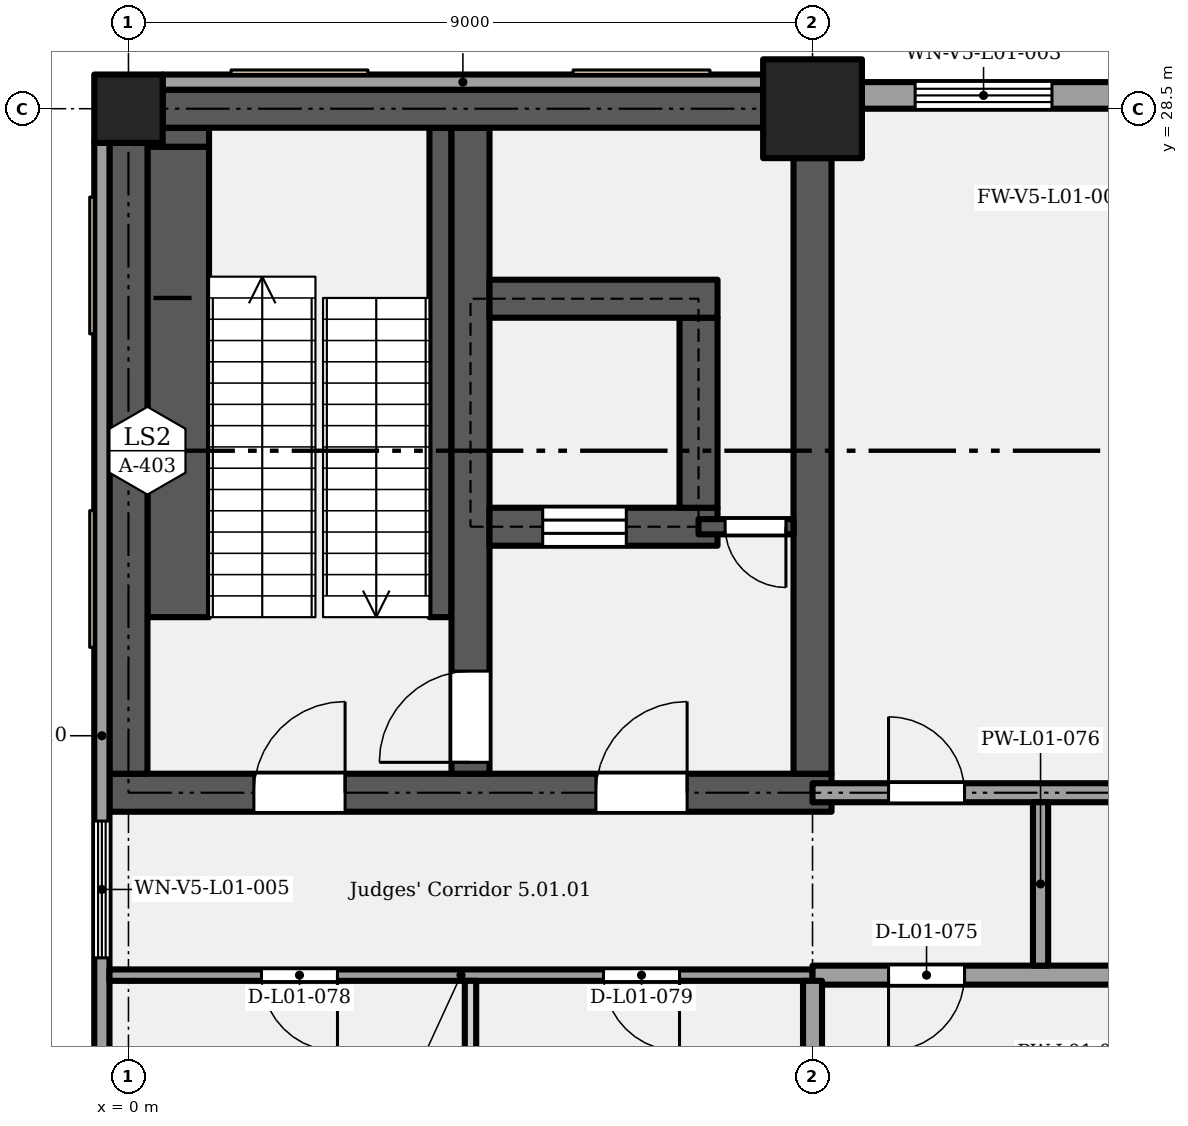
"""IFC4 building model, lengths in metres.
Left out: names, types, materials, properties, quantities, classifications, styles, units other than length and angle.
Written with IfcOpenShell. Run it as: python <this file> out.ifc"""

import sys

from ifc_helpers import new_model, si_unit, direction, frame, frame_2d, origin, origin_2d, place, context, subcontext, project, spatial, rectangle, extrude, element, fill, save


model = new_model("IFC4")
c1 = context("Model", 3, precision=1e-05, world=origin(), true_north=direction((0.0, 1.0)))
c2 = subcontext(c1, "Body", "Model", "MODEL_VIEW")
j1 = project(units=[si_unit("LENGTHUNIT", "METRE"), si_unit("PLANEANGLEUNIT", "RADIAN")], contexts=[c1])
p1 = place(None, origin())
s1 = spatial("IfcSite", under=j1, at=p1, CompositionType="ELEMENT")
p2 = place(p1, origin())
s2 = spatial("IfcBuilding", under=s1, at=p2, CompositionType="ELEMENT")
p3 = place(p2, frame((0.0, 0.0, 6.6)))
s3 = spatial("IfcBuildingStorey", under=s2, at=p3, CompositionType="ELEMENT", Elevation=6.6)
p4 = place(p3, frame((0.0, 28.5, 0.0), z_axis=(0.0, 0.0, 1.0), x_axis=(1.0, 0.0, 0.0)))
e1 = element("IfcColumn", 1, at=p4, inside=s3, PredefinedType="COLUMN", context=c2, shape_type="SweptSolid", body=[
    extrude(rectangle(XDim=0.9, YDim=0.9, at=origin_2d()), origin(), (0.0, 0.0, 1.0), 5.4),
])
p5 = place(p3, frame((9.0, 28.5, 0.0), z_axis=(0.0, 0.0, 1.0), x_axis=(1.0, 0.0, 0.0)))
e2 = element("IfcColumn", 2, at=p5, inside=s3, PredefinedType="COLUMN", context=c2, shape_type="SweptSolid", body=[
    extrude(rectangle(XDim=1.3, YDim=1.3, at=origin_2d()), origin(), (0.0, 0.0, 1.0), 5.4),
])
p6 = place(p3, frame((-0.25, 19.5, 0.0), z_axis=(0.0, 0.0, 1.0), x_axis=(1.0, 0.0, 0.0)))
e3 = element("IfcWall", 3, at=p6, inside=s3, PredefinedType="SHEAR", context=c2, shape_type="SweptSolid", body=[
    extrude(rectangle(XDim=9.5, YDim=0.5, at=frame_2d((4.75, 0.0))), origin(), (0.0, 0.0, 1.0), 5.1),
])
p7 = place(p6, frame((1.9, 0.0, 0.0)))
e4 = element("IfcOpeningElement", 4, at=p7, cuts=e3, PredefinedType="OPENING", context=c2, shape_type="SweptSolid", body=[
    extrude(rectangle(XDim=1.2, YDim=2.1, at=frame_2d((0.6, 1.05))), frame((0.0, 0.26, 0.0), z_axis=(0.0, -1.0, 0.0), x_axis=(1.0, 0.0, 0.0)), (0.0, 0.0, 1.0), 0.52),
])
p8 = place(p6, frame((6.4, 0.0, 0.0)))
e5 = element("IfcOpeningElement", 5, at=p8, cuts=e3, PredefinedType="OPENING", context=c2, shape_type="SweptSolid", body=[
    extrude(rectangle(XDim=1.2, YDim=2.1, at=frame_2d((0.6, 1.05))), frame((0.0, 0.26, 0.0), z_axis=(0.0, -1.0, 0.0), x_axis=(1.0, 0.0, 0.0)), (0.0, 0.0, 1.0), 0.52),
])
p9 = place(p3, frame((0.0, 19.75, 0.0), z_axis=(0.0, 0.0, 1.0), x_axis=(0.0, 1.0, 0.0)))
e6 = element("IfcWall", 6, at=p9, inside=s3, PredefinedType="SHEAR", context=c2, shape_type="SweptSolid", body=[
    extrude(rectangle(XDim=8.3, YDim=0.5, at=frame_2d((4.15, 0.0))), origin(), (0.0, 0.0, 1.0), 5.1),
])
p10 = place(p3, frame((4.5, 19.75, 0.0), z_axis=(0.0, 0.0, 1.0), x_axis=(0.0, 1.0, 0.0)))
e7 = element("IfcWall", 7, at=p10, inside=s3, PredefinedType="SHEAR", context=c2, shape_type="SweptSolid", body=[
    extrude(rectangle(XDim=8.5, YDim=0.5, at=frame_2d((4.25, 0.0))), origin(), (0.0, 0.0, 1.0), 5.1),
])
p11 = place(p10, frame((0.15, 0.0, 0.0)))
e8 = element("IfcOpeningElement", 8, at=p11, cuts=e7, PredefinedType="OPENING", context=c2, shape_type="SweptSolid", body=[
    extrude(rectangle(XDim=1.2, YDim=2.1, at=frame_2d((0.6, 1.05))), frame((0.0, 0.26, 0.0), z_axis=(0.0, -1.0, 0.0), x_axis=(1.0, 0.0, 0.0)), (0.0, 0.0, 1.0), 0.52),
])
p12 = place(p3, frame((9.0, 19.75, 0.0), z_axis=(0.0, 0.0, 1.0), x_axis=(0.0, 1.0, 0.0)))
e9 = element("IfcWall", 9, at=p12, inside=s3, PredefinedType="SHEAR", context=c2, shape_type="SweptSolid", body=[
    extrude(rectangle(XDim=8.1, YDim=0.5, at=frame_2d((4.05, 0.0))), origin(), (0.0, 0.0, 1.0), 5.1),
])
p13 = place(p3, frame((4.75, 23.0, 0.0), z_axis=(0.0, 0.0, 1.0), x_axis=(1.0, 0.0, 0.0)))
e10 = element("IfcWall", 10, at=p13, inside=s3, PredefinedType="SHEAR", context=c2, shape_type="SweptSolid", body=[
    extrude(rectangle(XDim=3.0, YDim=0.5, at=frame_2d((1.5, 0.0))), origin(), (0.0, 0.0, 1.0), 5.1),
])
p14 = place(p13, frame((0.7, 0.0, 0.0)))
e11 = element("IfcOpeningElement", 11, at=p14, cuts=e10, PredefinedType="OPENING", context=c2, shape_type="SweptSolid", body=[
    extrude(rectangle(XDim=1.1, YDim=2.1, at=frame_2d((0.55, 1.05))), frame((0.0, 0.26, 0.0), z_axis=(0.0, -1.0, 0.0), x_axis=(1.0, 0.0, 0.0)), (0.0, 0.0, 1.0), 0.52),
])
p15 = place(p3, frame((7.5, 23.25, 0.0), z_axis=(0.0, 0.0, 1.0), x_axis=(0.0, 1.0, 0.0)))
e12 = element("IfcWall", 12, at=p15, inside=s3, PredefinedType="SHEAR", context=c2, shape_type="SweptSolid", body=[
    extrude(rectangle(XDim=2.5, YDim=0.5, at=frame_2d((1.25, 0.0))), origin(), (0.0, 0.0, 1.0), 5.1),
])
p16 = place(p3, frame((4.75, 26.0, 0.0), z_axis=(0.0, 0.0, 1.0), x_axis=(1.0, 0.0, 0.0)))
e13 = element("IfcWall", 13, at=p16, inside=s3, PredefinedType="SHEAR", context=c2, shape_type="SweptSolid", body=[
    extrude(rectangle(XDim=3.0, YDim=0.5, at=frame_2d((1.5, 0.0))), origin(), (0.0, 0.0, 1.0), 5.1),
])
p17 = place(p3, frame((0.45, 28.5, 0.0), z_axis=(0.0, 0.0, 1.0), x_axis=(1.0, 0.0, 0.0)))
e14 = element("IfcWall", 14, at=p17, inside=s3, PredefinedType="SHEAR", context=c2, shape_type="SweptSolid", body=[
    extrude(rectangle(XDim=7.9, YDim=0.5, at=frame_2d((3.95, 0.0))), origin(), (0.0, 0.0, 1.0), 5.1),
])
p18 = place(p3, frame((0.45, 28.85, 0.0), z_axis=(0.0, 0.0, 1.0), x_axis=(1.0, 0.0, 0.0)))
e15 = element("IfcWall", 15, at=p18, inside=s3, PredefinedType="SOLIDWALL", context=c2, shape_type="SweptSolid", body=[
    extrude(rectangle(XDim=7.9, YDim=0.2, at=frame_2d((3.95, 0.0))), origin(), (0.0, 0.0, 1.0), 5.1),
])
p19 = place(p3, frame((9.65, 28.675, 0.0), z_axis=(0.0, 0.0, 1.0), x_axis=(1.0, 0.0, 0.0)))
e16 = element("IfcWall", 16, at=p19, inside=s3, PredefinedType="SOLIDWALL", context=c2, shape_type="SweptSolid", body=[
    extrude(rectangle(XDim=7.7, YDim=0.35, at=frame_2d((3.85, 0.0))), origin(), (0.0, 0.0, 1.0), 5.1),
])
p20 = place(p19, frame((0.7, 0.0, 1.2)))
e17 = element("IfcOpeningElement", 17, at=p20, cuts=e16, PredefinedType="OPENING", context=c2, shape_type="SweptSolid", body=[
    extrude(rectangle(XDim=1.8, YDim=3.3, at=frame_2d((0.9, 1.65))), frame((0.0, 0.185, 0.0), z_axis=(0.0, -1.0, 0.0), x_axis=(1.0, 0.0, 0.0)), (0.0, 0.0, 1.0), 0.37),
])
p21 = place(p19, frame((5.2, 0.0, 1.2)))
e18 = element("IfcOpeningElement", 18, at=p21, cuts=e16, PredefinedType="OPENING", context=c2, shape_type="SweptSolid", body=[
    extrude(rectangle(XDim=1.8, YDim=3.3, at=frame_2d((0.9, 1.65))), frame((0.0, 0.185, 0.0), z_axis=(0.0, -1.0, 0.0), x_axis=(1.0, 0.0, 0.0)), (0.0, 0.0, 1.0), 0.37),
])
p22 = place(p3, frame((-0.35, 12.45, 0.0), z_axis=(0.0, 0.0, 1.0), x_axis=(0.0, 1.0, 0.0)))
e19 = element("IfcWall", 19, at=p22, inside=s3, PredefinedType="SOLIDWALL", context=c2, shape_type="SweptSolid", body=[
    extrude(rectangle(XDim=15.6, YDim=0.2, at=frame_2d((7.8, 0.0))), origin(), (0.0, 0.0, 1.0), 5.1),
])
p23 = place(p22, frame((4.877, 0.0, 1.2)))
e20 = element("IfcOpeningElement", 20, at=p23, cuts=e19, PredefinedType="OPENING", context=c2, shape_type="SweptSolid", body=[
    extrude(rectangle(XDim=1.8, YDim=3.3, at=frame_2d((0.9, 1.65))), frame((0.0, 0.11, 0.0), z_axis=(0.0, -1.0, 0.0), x_axis=(1.0, 0.0, 0.0)), (0.0, 0.0, 1.0), 0.22),
])
p24 = place(p3, frame((-0.25, 17.1, 0.0), z_axis=(0.0, 0.0, 1.0), x_axis=(1.0, 0.0, 0.0)))
e21 = element("IfcWall", 21, at=p24, inside=s3, PredefinedType="PARTITIONING", context=c2, shape_type="SweptSolid", body=[
    extrude(rectangle(XDim=9.25, YDim=0.15, at=frame_2d((4.625, 0.0))), origin(), (0.0, 0.0, 1.0), 5.1),
])
p25 = place(p24, frame((3.0, 0.0, 0.0), z_axis=(0.0, 0.0, 1.0), x_axis=(-1.0, 0.0, 0.0)))
e22 = element("IfcOpeningElement", 22, at=p25, cuts=e21, PredefinedType="OPENING", context=c2, shape_type="SweptSolid", body=[
    extrude(rectangle(XDim=1.0, YDim=2.1, at=frame_2d((0.5, 1.05))), frame((0.0, 0.085, 0.0), z_axis=(0.0, -1.0, 0.0), x_axis=(1.0, 0.0, 0.0)), (0.0, 0.0, 1.0), 0.17),
])
p26 = place(p24, frame((7.5, 0.0, 0.0), z_axis=(0.0, 0.0, 1.0), x_axis=(-1.0, 0.0, 0.0)))
e23 = element("IfcOpeningElement", 23, at=p26, cuts=e21, PredefinedType="OPENING", context=c2, shape_type="SweptSolid", body=[
    extrude(rectangle(XDim=1.0, YDim=2.1, at=frame_2d((0.5, 1.05))), frame((0.0, 0.085, 0.0), z_axis=(0.0, -1.0, 0.0), x_axis=(1.0, 0.0, 0.0)), (0.0, 0.0, 1.0), 0.17),
])
p27 = place(p3, frame((9.0, 17.1, 0.0), z_axis=(0.0, 0.0, 1.0), x_axis=(1.0, 0.0, 0.0)))
e24 = element("IfcWall", 24, at=p27, inside=s3, PredefinedType="PARTITIONING", context=c2, shape_type="SweptSolid", body=[
    extrude(rectangle(XDim=9.0, YDim=0.25, at=frame_2d((4.5, 0.0))), origin(), (0.0, 0.0, 1.0), 5.1),
])
p28 = place(p27, frame((6.9, 0.0, 0.0), z_axis=(0.0, 0.0, 1.0), x_axis=(-1.0, 0.0, 0.0)))
e25 = element("IfcOpeningElement", 25, at=p28, cuts=e24, PredefinedType="OPENING", context=c2, shape_type="SweptSolid", body=[
    extrude(rectangle(XDim=1.8, YDim=2.4, at=frame_2d((0.9, 1.2))), frame((0.0, 0.135, 0.0), z_axis=(0.0, -1.0, 0.0), x_axis=(1.0, 0.0, 0.0)), (0.0, 0.0, 1.0), 0.27),
])
p29 = place(p27, frame((2.0, 0.0, 0.0), z_axis=(0.0, 0.0, 1.0), x_axis=(-1.0, 0.0, 0.0)))
e26 = element("IfcOpeningElement", 26, at=p29, cuts=e24, PredefinedType="OPENING", context=c2, shape_type="SweptSolid", body=[
    extrude(rectangle(XDim=1.0, YDim=2.1, at=frame_2d((0.5, 1.05))), frame((0.0, 0.135, 0.0), z_axis=(0.0, -1.0, 0.0), x_axis=(1.0, 0.0, 0.0)), (0.0, 0.0, 1.0), 0.27),
])
p30 = place(p3, frame((9.0, 19.5, 0.0), z_axis=(0.0, 0.0, 1.0), x_axis=(1.0, 0.0, 0.0)))
e27 = element("IfcWall", 27, at=p30, inside=s3, PredefinedType="PARTITIONING", context=c2, shape_type="SweptSolid", body=[
    extrude(rectangle(XDim=9.0, YDim=0.25, at=frame_2d((4.5, 0.0))), origin(), (0.0, 0.0, 1.0), 5.1),
])
p31 = place(p30, frame((5.1, 0.0, 0.0)))
e28 = element("IfcOpeningElement", 28, at=p31, cuts=e27, PredefinedType="OPENING", context=c2, shape_type="SweptSolid", body=[
    extrude(rectangle(XDim=1.8, YDim=2.4, at=frame_2d((0.9, 1.2))), frame((0.0, 0.135, 0.0), z_axis=(0.0, -1.0, 0.0), x_axis=(1.0, 0.0, 0.0)), (0.0, 0.0, 1.0), 0.27),
])
p32 = place(p30, frame((1.0, 0.0, 0.0)))
e29 = element("IfcOpeningElement", 29, at=p32, cuts=e27, PredefinedType="OPENING", context=c2, shape_type="SweptSolid", body=[
    extrude(rectangle(XDim=1.0, YDim=2.1, at=frame_2d((0.5, 1.05))), frame((0.0, 0.135, 0.0), z_axis=(0.0, -1.0, 0.0), x_axis=(1.0, 0.0, 0.0)), (0.0, 0.0, 1.0), 0.27),
])
p33 = place(p3, frame((7.5, 23.0, 0.0), z_axis=(0.0, 0.0, 1.0), x_axis=(1.0, 0.0, 0.0)))
e30 = element("IfcWall", 30, at=p33, inside=s3, PredefinedType="SHEAR", context=c2, shape_type="SweptSolid", body=[
    extrude(rectangle(XDim=1.25, YDim=0.2, at=frame_2d((0.625, 0.0))), origin(), (0.0, 0.0, 1.0), 5.1),
])
p34 = place(p33, frame((1.15, 0.0, 0.0), z_axis=(0.0, 0.0, 1.0), x_axis=(-1.0, 0.0, 0.0)))
e31 = element("IfcOpeningElement", 31, at=p34, cuts=e30, PredefinedType="OPENING", context=c2, shape_type="SweptSolid", body=[
    extrude(rectangle(XDim=0.8, YDim=2.0, at=frame_2d((0.4, 1.0))), frame((0.0, 0.11, 0.0), z_axis=(0.0, -1.0, 0.0), x_axis=(1.0, 0.0, 0.0)), (0.0, 0.0, 1.0), 0.22),
])
p35 = place(p3, frame((4.5, 12.0, 0.0), z_axis=(0.0, 0.0, 1.0), x_axis=(0.0, 1.0, 0.0)))
e32 = element("IfcWall", 32, at=p35, inside=s3, PredefinedType="PARTITIONING", context=c2, shape_type="SweptSolid", body=[
    extrude(rectangle(XDim=5.025, YDim=0.15, at=frame_2d((2.512, 0.0))), origin(), (0.0, 0.0, 1.0), 5.1),
])
p36 = place(p3, frame((9.0, 12.65, 0.0), z_axis=(0.0, 0.0, 1.0), x_axis=(0.0, 1.0, 0.0)))
e33 = element("IfcWall", 33, at=p36, inside=s3, PredefinedType="PARTITIONING", context=c2, shape_type="SweptSolid", body=[
    extrude(rectangle(XDim=4.375, YDim=0.25, at=frame_2d((2.188, 0.0))), origin(), (0.0, 0.0, 1.0), 4.15),
])
p37 = place(p36, frame((2.4, 0.0, 0.0), z_axis=(0.0, 0.0, 1.0), x_axis=(-1.0, 0.0, 0.0)))
e34 = element("IfcOpeningElement", 34, at=p37, cuts=e33, PredefinedType="OPENING", context=c2, shape_type="SweptSolid", body=[
    extrude(rectangle(XDim=1.0, YDim=2.1, at=frame_2d((0.5, 1.05))), frame((0.0, 0.135, 0.0), z_axis=(0.0, -1.0, 0.0), x_axis=(1.0, 0.0, 0.0)), (0.0, 0.0, 1.0), 0.27),
])
p38 = place(p3, frame((12.0, 17.225, 0.0), z_axis=(0.0, 0.0, 1.0), x_axis=(0.0, 1.0, 0.0)))
e35 = element("IfcWall", 35, at=p38, inside=s3, PredefinedType="PARTITIONING", context=c2, shape_type="SweptSolid", body=[
    extrude(rectangle(XDim=2.15, YDim=0.2, at=frame_2d((1.075, 0.0))), origin(), (0.0, 0.0, 1.0), 5.1),
])
p39 = place(p3, frame((0.655, 21.81, 0.0), z_axis=(0.0, 0.0, 1.0), x_axis=(0.0, 1.0, 0.0)))
e36 = element("IfcWall", 36, at=p39, inside=s3, PredefinedType="SHEAR", context=c2, shape_type="SweptSolid", body=[
    extrude(rectangle(XDim=6.19, YDim=0.81, at=frame_2d((3.095, 0.0))), origin(), (0.0, 0.0, 1.0), 2.587),
])
p40 = place(p3, frame((0.705, 28.0, 0.0), z_axis=(0.0, 0.0, 1.0), x_axis=(0.0, 1.0, 0.0)))
e37 = element("IfcWall", 37, at=p40, inside=s3, PredefinedType="SHEAR", context=c2, shape_type="SweptSolid", body=[
    extrude(rectangle(XDim=0.25, YDim=0.71, at=frame_2d((0.125, 0.0))), origin(), (0.0, 0.0, 1.0), 2.587),
])
p41 = place(p3, frame((4.105, 21.81, 0.0), z_axis=(0.0, 0.0, 1.0), x_axis=(0.0, 1.0, 0.0)))
e38 = element("IfcWall", 38, at=p41, inside=s3, PredefinedType="SHEAR", context=c2, shape_type="SweptSolid", body=[
    extrude(rectangle(XDim=6.44, YDim=0.29, at=frame_2d((3.22, 0.0))), origin(), (0.0, 0.0, 1.0), 2.587),
])
p42 = place(p20, origin())
e39 = element("IfcWindow", 39, at=p42, inside=s3, PartitioningType="SINGLE_PANEL", PredefinedType="WINDOW", context=c2, shape_type="SweptSolid", body=[
    extrude(rectangle(XDim=1.8, YDim=3.3, at=frame_2d((0.9, 1.65))), frame((0.0, 0.03, 0.0), z_axis=(0.0, -1.0, 0.0), x_axis=(1.0, 0.0, 0.0)), (0.0, 0.0, 1.0), 0.06),
])
fill(e17, e39)
p43 = place(p23, origin())
e40 = element("IfcWindow", 40, at=p43, inside=s3, PartitioningType="SINGLE_PANEL", PredefinedType="WINDOW", context=c2, shape_type="SweptSolid", body=[
    extrude(rectangle(XDim=1.8, YDim=3.3, at=frame_2d((0.9, 1.65))), frame((0.0, 0.03, 0.0), z_axis=(0.0, -1.0, 0.0), x_axis=(1.0, 0.0, 0.0)), (0.0, 0.0, 1.0), 0.06),
])
fill(e20, e40)
p44 = place(p7, origin())
e41 = element("IfcDoor", 41, at=p44, inside=s3, OperationType="SINGLE_SWING_RIGHT", PredefinedType="DOOR", context=c2, shape_type="SweptSolid", body=[
    extrude(rectangle(XDim=1.2, YDim=2.1, at=frame_2d((0.6, 1.05))), frame((0.0, 0.025, 0.0), z_axis=(0.0, -1.0, 0.0), x_axis=(1.0, 0.0, 0.0)), (0.0, 0.0, 1.0), 0.05),
])
fill(e4, e41)
p45 = place(p11, origin())
e42 = element("IfcDoor", 42, at=p45, inside=s3, OperationType="SINGLE_SWING_LEFT", PredefinedType="DOOR", context=c2, shape_type="SweptSolid", body=[
    extrude(rectangle(XDim=1.2, YDim=2.1, at=frame_2d((0.6, 1.05))), frame((0.0, 0.025, 0.0), z_axis=(0.0, -1.0, 0.0), x_axis=(1.0, 0.0, 0.0)), (0.0, 0.0, 1.0), 0.05),
])
fill(e8, e42)
p46 = place(p8, origin())
e43 = element("IfcDoor", 43, at=p46, inside=s3, OperationType="SINGLE_SWING_RIGHT", PredefinedType="DOOR", context=c2, shape_type="SweptSolid", body=[
    extrude(rectangle(XDim=1.2, YDim=2.1, at=frame_2d((0.6, 1.05))), frame((0.0, 0.025, 0.0), z_axis=(0.0, -1.0, 0.0), x_axis=(1.0, 0.0, 0.0)), (0.0, 0.0, 1.0), 0.05),
])
fill(e5, e43)
p47 = place(p14, origin())
e44 = element("IfcDoor", 44, at=p47, inside=s3, OperationType="SLIDING_TO_LEFT", PredefinedType="DOOR", context=c2, shape_type="SweptSolid", body=[
    extrude(rectangle(XDim=1.1, YDim=2.1, at=frame_2d((0.55, 1.05))), frame((0.0, 0.025, 0.0), z_axis=(0.0, -1.0, 0.0), x_axis=(1.0, 0.0, 0.0)), (0.0, 0.0, 1.0), 0.05),
])
fill(e11, e44)
p48 = place(p34, origin())
e45 = element("IfcDoor", 45, at=p48, inside=s3, OperationType="SINGLE_SWING_LEFT", PredefinedType="DOOR", context=c2, shape_type="SweptSolid", body=[
    extrude(rectangle(XDim=0.8, YDim=2.0, at=frame_2d((0.4, 1.0))), frame((0.0, 0.025, 0.0), z_axis=(0.0, -1.0, 0.0), x_axis=(1.0, 0.0, 0.0)), (0.0, 0.0, 1.0), 0.05),
])
fill(e31, e45)
p49 = place(p29, origin())
e46 = element("IfcDoor", 46, at=p49, inside=s3, OperationType="SINGLE_SWING_RIGHT", PredefinedType="DOOR", context=c2, shape_type="SweptSolid", body=[
    extrude(rectangle(XDim=1.0, YDim=2.1, at=frame_2d((0.5, 1.05))), frame((0.0, 0.025, 0.0), z_axis=(0.0, -1.0, 0.0), x_axis=(1.0, 0.0, 0.0)), (0.0, 0.0, 1.0), 0.05),
])
fill(e26, e46)
p50 = place(p32, origin())
e47 = element("IfcDoor", 47, at=p50, inside=s3, OperationType="SINGLE_SWING_LEFT", PredefinedType="DOOR", context=c2, shape_type="SweptSolid", body=[
    extrude(rectangle(XDim=1.0, YDim=2.1, at=frame_2d((0.5, 1.05))), frame((0.0, 0.025, 0.0), z_axis=(0.0, -1.0, 0.0), x_axis=(1.0, 0.0, 0.0)), (0.0, 0.0, 1.0), 0.05),
])
fill(e29, e47)
p51 = place(p25, origin())
e48 = element("IfcDoor", 48, at=p51, inside=s3, OperationType="SINGLE_SWING_LEFT", PredefinedType="DOOR", context=c2, shape_type="SweptSolid", body=[
    extrude(rectangle(XDim=1.0, YDim=2.1, at=frame_2d((0.5, 1.05))), frame((0.0, 0.025, 0.0), z_axis=(0.0, -1.0, 0.0), x_axis=(1.0, 0.0, 0.0)), (0.0, 0.0, 1.0), 0.05),
])
fill(e22, e48)
p52 = place(p26, origin())
e49 = element("IfcDoor", 49, at=p52, inside=s3, OperationType="SINGLE_SWING_LEFT", PredefinedType="DOOR", context=c2, shape_type="SweptSolid", body=[
    extrude(rectangle(XDim=1.0, YDim=2.1, at=frame_2d((0.5, 1.05))), frame((0.0, 0.025, 0.0), z_axis=(0.0, -1.0, 0.0), x_axis=(1.0, 0.0, 0.0)), (0.0, 0.0, 1.0), 0.05),
])
fill(e23, e49)
save(model, sys.argv[1])
